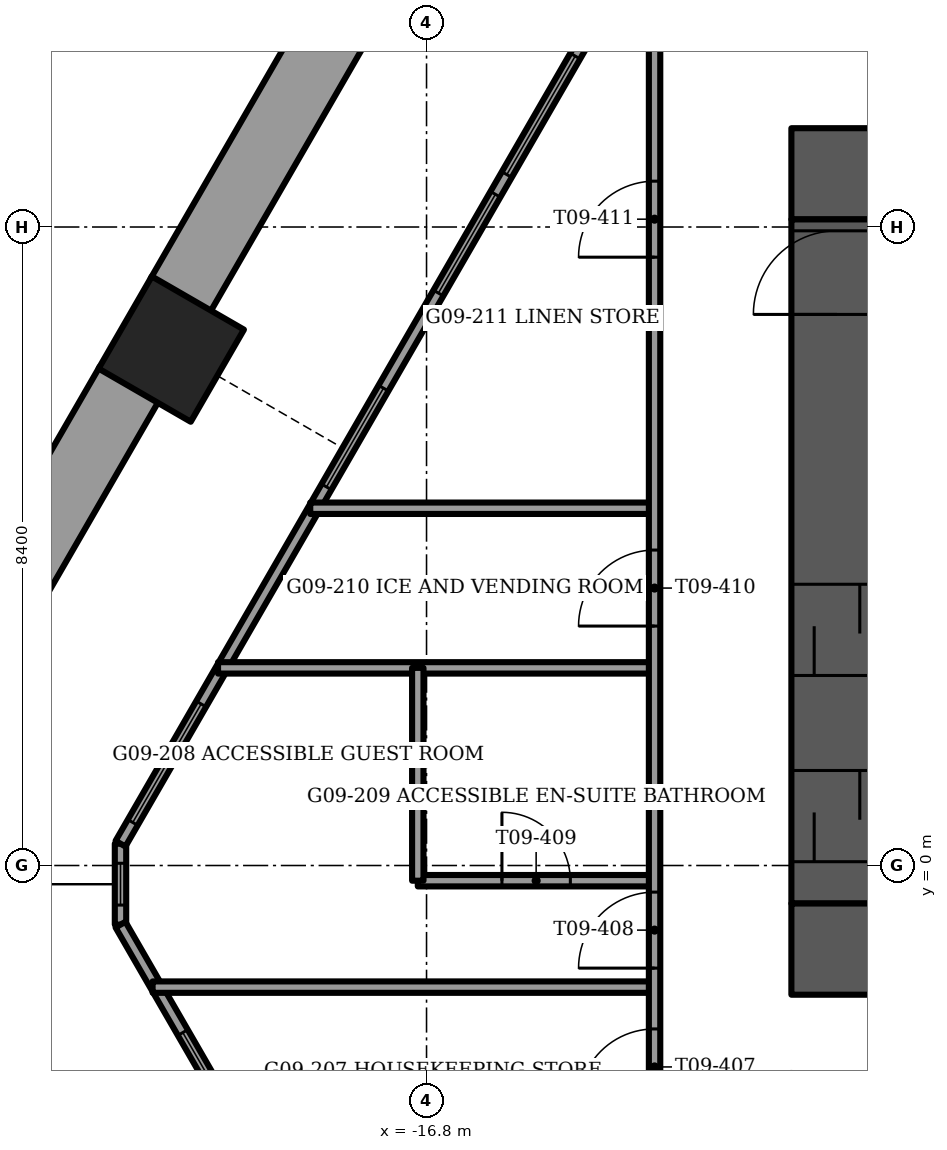
"""IFC4 building model, lengths in metres.
Left out: names, types, materials, properties, quantities, classifications, styles, units other than length and angle.
Written with IfcOpenShell. Run it as: python <this file> out.ifc"""

import sys

from ifc_helpers import new_model, si_unit, direction, frame, frame_2d, origin, origin_2d, place, context, subcontext, project, spatial, rectangle, extrude, element, fill, save


model = new_model("IFC4")
c1 = context("Model", 3, precision=1e-05, world=origin(), true_north=direction((0.0, 1.0)))
c2 = subcontext(c1, "Body", "Model", "MODEL_VIEW")
j1 = project(units=[si_unit("LENGTHUNIT", "METRE"), si_unit("PLANEANGLEUNIT", "RADIAN")], contexts=[c1])
p1 = place(None, origin())
s1 = spatial("IfcSite", under=j1, at=p1, CompositionType="ELEMENT")
p2 = place(p1, origin())
s2 = spatial("IfcBuilding", under=s1, at=p2, CompositionType="ELEMENT")
p3 = place(p2, frame((0.0, 0.0, 39.25)))
s3 = spatial("IfcBuildingStorey", under=s2, at=p3, CompositionType="ELEMENT", Elevation=39.25)
p4 = place(p3, frame((-20.158, 6.794, -1.2), z_axis=(0.0, 0.0, 1.0), x_axis=(0.5, 0.866025403784, 0.0)))
e1 = element("IfcColumn", 1, at=p4, inside=s3, PredefinedType="COLUMN", context=c2, shape_type="SweptSolid", body=[
    extrude(rectangle(XDim=1.4, YDim=1.4, at=origin_2d()), origin(), (0.0, 0.0, 1.0), 3.75),
])
p5 = place(p3, frame((-12.0, -1.1, -0.3), z_axis=(0.0, 0.0, 1.0), x_axis=(1.0, 0.0, 0.0)))
e2 = element("IfcWall", 2, at=p5, inside=s3, PredefinedType="SHEAR", context=c2, shape_type="SweptSolid", body=[
    extrude(rectangle(XDim=24.0, YDim=1.2, at=frame_2d((12.0, 0.0))), origin(), (0.0, 0.0, 1.0), 3.75),
])
p6 = place(p5, frame((11.2, 0.0, 0.0)))
e3 = element("IfcOpeningElement", 3, at=p6, cuts=e2, PredefinedType="OPENING", context=c2, shape_type="SweptSolid", body=[
    extrude(rectangle(XDim=1.6, YDim=2.1, at=frame_2d((0.8, 1.05))), frame((0.0, 0.6, 0.0), z_axis=(0.0, -1.0, 0.0), x_axis=(1.0, 0.0, 0.0)), (0.0, 0.0, 1.0), 1.2),
])
p7 = place(p3, frame((-12.0, 9.1, -0.3), z_axis=(0.0, 0.0, 1.0), x_axis=(1.0, 0.0, 0.0)))
e4 = element("IfcWall", 4, at=p7, inside=s3, PredefinedType="SHEAR", context=c2, shape_type="SweptSolid", body=[
    extrude(rectangle(XDim=24.0, YDim=1.2, at=frame_2d((12.0, 0.0))), origin(), (0.0, 0.0, 1.0), 3.75),
])
p8 = place(p7, frame((11.2, 0.0, 0.0)))
e5 = element("IfcOpeningElement", 5, at=p8, cuts=e4, PredefinedType="OPENING", context=c2, shape_type="SweptSolid", body=[
    extrude(rectangle(XDim=1.6, YDim=2.1, at=frame_2d((0.8, 1.05))), frame((0.0, 0.6, 0.0), z_axis=(0.0, -1.0, 0.0), x_axis=(1.0, 0.0, 0.0)), (0.0, 0.0, 1.0), 1.2),
])
p9 = place(p7, frame((5.25, 0.0, 0.0)))
e6 = element("IfcOpeningElement", 6, at=p9, cuts=e4, PredefinedType="OPENING", context=c2, shape_type="SweptSolid", body=[
    extrude(rectangle(XDim=1.1, YDim=2.1, at=frame_2d((0.55, 1.05))), frame((0.0, 0.6, 0.0), z_axis=(0.0, -1.0, 0.0), x_axis=(1.0, 0.0, 0.0)), (0.0, 0.0, 1.0), 1.2),
])
p10 = place(p7, frame((17.65, 0.0, 0.0)))
e7 = element("IfcOpeningElement", 7, at=p10, cuts=e4, PredefinedType="OPENING", context=c2, shape_type="SweptSolid", body=[
    extrude(rectangle(XDim=1.1, YDim=2.1, at=frame_2d((0.55, 1.05))), frame((0.0, 0.6, 0.0), z_axis=(0.0, -1.0, 0.0), x_axis=(1.0, 0.0, 0.0)), (0.0, 0.0, 1.0), 1.2),
])
p11 = place(p3, frame((-11.4, -0.5, -0.3), z_axis=(0.0, 0.0, 1.0), x_axis=(0.0, 1.0, 0.0)))
e8 = element("IfcWall", 8, at=p11, inside=s3, PredefinedType="SHEAR", context=c2, shape_type="SweptSolid", body=[
    extrude(rectangle(XDim=9.0, YDim=1.2, at=frame_2d((4.5, 0.0))), origin(), (0.0, 0.0, 1.0), 3.75),
])
p12 = place(p11, frame((7.75, 0.0, 0.0)))
e9 = element("IfcOpeningElement", 9, at=p12, cuts=e8, PredefinedType="OPENING", context=c2, shape_type="SweptSolid", body=[
    extrude(rectangle(XDim=1.1, YDim=2.1, at=frame_2d((0.55, 1.05))), frame((0.0, 0.6, 0.0), z_axis=(0.0, -1.0, 0.0), x_axis=(1.0, 0.0, 0.0)), (0.0, 0.0, 1.0), 1.2),
])
p13 = place(p11, frame((0.55, 0.0, 0.0)))
e10 = element("IfcOpeningElement", 10, at=p13, cuts=e8, PredefinedType="OPENING", context=c2, shape_type="SweptSolid", body=[
    extrude(rectangle(XDim=1.2, YDim=2.1, at=frame_2d((0.6, 1.05))), frame((0.0, 0.6, 0.0), z_axis=(0.0, -1.0, 0.0), x_axis=(1.0, 0.0, 0.0)), (0.0, 0.0, 1.0), 1.2),
])
p14 = place(p11, frame((3.0, 0.0, 0.0)))
e11 = element("IfcOpeningElement", 11, at=p14, cuts=e8, PredefinedType="OPENING", context=c2, shape_type="SweptSolid", body=[
    extrude(rectangle(XDim=1.2, YDim=2.1, at=frame_2d((0.6, 1.05))), frame((0.0, 0.6, 0.0), z_axis=(0.0, -1.0, 0.0), x_axis=(1.0, 0.0, 0.0)), (0.0, 0.0, 1.0), 1.2),
])
p15 = place(p3, frame((-16.514, 13.605, 0.0), z_axis=(0.0, 0.0, 1.0), x_axis=(-0.499997206141, -0.866027016814, 0.0)))
e12 = element("IfcWall", 12, at=p15, inside=s3, PredefinedType="PARAPET", context=c2, shape_type="SweptSolid", body=[
    extrude(rectangle(XDim=7.051, YDim=0.9, at=frame_2d((3.525, 0.0))), origin(), (0.0, 0.0, 1.0), 1.1),
])
p16 = place(p3, frame((-20.71, 6.339, 0.0), z_axis=(0.0, 0.0, 1.0), x_axis=(-0.499994135611, -0.866028789565, 0.0)))
e13 = element("IfcWall", 13, at=p16, inside=s3, PredefinedType="PARAPET", context=c2, shape_type="SweptSolid", body=[
    extrude(rectangle(XDim=6.845, YDim=0.9, at=frame_2d((3.423, 0.0))), origin(), (0.0, 0.0, 1.0), 1.1),
])
p17 = place(p3, frame((-24.132, -0.901, 0.0), z_axis=(0.0, 0.0, 1.0), x_axis=(0.499983599745, -0.866034872269, 0.0)))
e14 = element("IfcWall", 14, at=p17, inside=s3, PredefinedType="PARAPET", context=c2, shape_type="SweptSolid", body=[
    extrude(rectangle(XDim=6.42, YDim=0.9, at=frame_2d((3.21, 0.0))), origin(), (0.0, 0.0, 1.0), 1.1),
])
p18 = place(p3, frame((-9.276, 20.292, 0.0), z_axis=(0.0, 0.0, 1.0), x_axis=(-0.500006057782, -0.866021906294, 0.0)))
e15 = element("IfcWall", 15, at=p18, inside=s3, PredefinedType="SOLIDWALL", context=c2, shape_type="SweptSolid", body=[
    extrude(rectangle(XDim=23.1, YDim=0.15, at=frame_2d((11.55, 0.0))), origin(), (0.0, 0.0, 1.0), 3.45),
])
p19 = place(p18, frame((2.736, 0.0, 0.15)))
e16 = element("IfcOpeningElement", 16, at=p19, cuts=e15, PredefinedType="OPENING", context=c2, shape_type="SweptSolid", body=[
    extrude(rectangle(XDim=0.9, YDim=2.85, at=frame_2d((0.45, 1.425))), frame((0.0, 0.075, 0.0), z_axis=(0.0, -1.0, 0.0), x_axis=(1.0, 0.0, 0.0)), (0.0, 0.0, 1.0), 0.15),
])
p20 = place(p18, frame((3.825, 0.0, 0.15)))
e17 = element("IfcOpeningElement", 17, at=p20, cuts=e15, PredefinedType="OPENING", context=c2, shape_type="SweptSolid", body=[
    extrude(rectangle(XDim=1.5, YDim=2.85, at=frame_2d((0.75, 1.425))), frame((0.0, 0.075, 0.0), z_axis=(0.0, -1.0, 0.0), x_axis=(1.0, 0.0, 0.0)), (0.0, 0.0, 1.0), 0.15),
])
p21 = place(p18, frame((9.32, 0.0, 0.15)))
e18 = element("IfcOpeningElement", 18, at=p21, cuts=e15, PredefinedType="OPENING", context=c2, shape_type="SweptSolid", body=[
    extrude(rectangle(XDim=0.9, YDim=2.85, at=frame_2d((0.45, 1.425))), frame((0.0, 0.075, 0.0), z_axis=(0.0, -1.0, 0.0), x_axis=(1.0, 0.0, 0.0)), (0.0, 0.0, 1.0), 0.15),
])
p22 = place(p18, frame((7.12, 0.0, 0.15)))
e19 = element("IfcOpeningElement", 19, at=p22, cuts=e15, PredefinedType="OPENING", context=c2, shape_type="SweptSolid", body=[
    extrude(rectangle(XDim=1.5, YDim=2.85, at=frame_2d((0.75, 1.425))), frame((0.0, 0.075, 0.0), z_axis=(0.0, -1.0, 0.0), x_axis=(1.0, 0.0, 0.0)), (0.0, 0.0, 1.0), 0.15),
])
p23 = place(p18, frame((11.136, 0.0, 0.15)))
e20 = element("IfcOpeningElement", 20, at=p23, cuts=e15, PredefinedType="OPENING", context=c2, shape_type="SweptSolid", body=[
    extrude(rectangle(XDim=1.8, YDim=2.85, at=frame_2d((0.9, 1.425))), frame((0.0, 0.075, 0.0), z_axis=(0.0, -1.0, 0.0), x_axis=(1.0, 0.0, 0.0)), (0.0, 0.0, 1.0), 0.15),
])
p24 = place(p18, frame((13.236, 0.0, 0.15)))
e21 = element("IfcOpeningElement", 21, at=p24, cuts=e15, PredefinedType="OPENING", context=c2, shape_type="SweptSolid", body=[
    extrude(rectangle(XDim=1.5, YDim=2.85, at=frame_2d((0.75, 1.425))), frame((0.0, 0.075, 0.0), z_axis=(0.0, -1.0, 0.0), x_axis=(1.0, 0.0, 0.0)), (0.0, 0.0, 1.0), 0.15),
])
p25 = place(p18, frame((16.18, 0.0, 0.15)))
e22 = element("IfcOpeningElement", 22, at=p25, cuts=e15, PredefinedType="OPENING", context=c2, shape_type="SweptSolid", body=[
    extrude(rectangle(XDim=1.5, YDim=2.85, at=frame_2d((0.75, 1.425))), frame((0.0, 0.075, 0.0), z_axis=(0.0, -1.0, 0.0), x_axis=(1.0, 0.0, 0.0)), (0.0, 0.0, 1.0), 0.15),
])
p26 = place(p18, frame((0.44, 0.0, 0.15)))
e23 = element("IfcOpeningElement", 23, at=p26, cuts=e15, PredefinedType="OPENING", context=c2, shape_type="SweptSolid", body=[
    extrude(rectangle(XDim=0.9, YDim=2.73, at=frame_2d((0.45, 1.365))), frame((0.0, 0.075, 0.0), z_axis=(0.0, -1.0, 0.0), x_axis=(1.0, 0.0, 0.0)), (0.0, 0.0, 1.0), 0.15),
])
p27 = place(p18, frame((20.978, 0.0, 0.15)))
e24 = element("IfcOpeningElement", 24, at=p27, cuts=e15, PredefinedType="OPENING", context=c2, shape_type="SweptSolid", body=[
    extrude(rectangle(XDim=1.8, YDim=2.73, at=frame_2d((0.9, 1.365))), frame((0.0, 0.075, 0.0), z_axis=(0.0, -1.0, 0.0), x_axis=(1.0, 0.0, 0.0)), (0.0, 0.0, 1.0), 0.15),
])
p28 = place(p3, frame((-20.826, -0.778, 0.0), z_axis=(0.0, 0.0, 1.0), x_axis=(0.499999841607, -0.866025495233, 0.0)))
e25 = element("IfcWall", 25, at=p28, inside=s3, PredefinedType="SOLIDWALL", context=c2, shape_type="SweptSolid", body=[
    extrude(rectangle(XDim=19.479, YDim=0.15, at=frame_2d((9.739, 0.0))), origin(), (0.0, 0.0, 1.0), 3.45),
])
p29 = place(p28, frame((1.639, 0.0, 0.15)))
e26 = element("IfcOpeningElement", 26, at=p29, cuts=e25, PredefinedType="OPENING", context=c2, shape_type="SweptSolid", body=[
    extrude(rectangle(XDim=0.9, YDim=2.85, at=frame_2d((0.45, 1.425))), frame((0.0, 0.075, 0.0), z_axis=(0.0, -1.0, 0.0), x_axis=(1.0, 0.0, 0.0)), (0.0, 0.0, 1.0), 0.15),
])
p30 = place(p28, frame((5.839, 0.0, 0.15)))
e27 = element("IfcOpeningElement", 27, at=p30, cuts=e25, PredefinedType="OPENING", context=c2, shape_type="SweptSolid", body=[
    extrude(rectangle(XDim=1.8, YDim=2.85, at=frame_2d((0.9, 1.425))), frame((0.0, 0.075, 0.0), z_axis=(0.0, -1.0, 0.0), x_axis=(1.0, 0.0, 0.0)), (0.0, 0.0, 1.0), 0.15),
])
p31 = place(p28, frame((7.939, 0.0, 0.0)))
e28 = element("IfcOpeningElement", 28, at=p31, cuts=e25, PredefinedType="OPENING", context=c2, shape_type="SweptSolid", body=[
    extrude(rectangle(XDim=1.5, YDim=2.4, at=frame_2d((0.75, 1.2))), frame((0.0, 0.075, 0.0), z_axis=(0.0, -1.0, 0.0), x_axis=(1.0, 0.0, 0.0)), (0.0, 0.0, 1.0), 0.15),
])
p32 = place(p28, frame((10.039, 0.0, 0.15)))
e29 = element("IfcOpeningElement", 29, at=p32, cuts=e25, PredefinedType="OPENING", context=c2, shape_type="SweptSolid", body=[
    extrude(rectangle(XDim=1.8, YDim=2.85, at=frame_2d((0.9, 1.425))), frame((0.0, 0.075, 0.0), z_axis=(0.0, -1.0, 0.0), x_axis=(1.0, 0.0, 0.0)), (0.0, 0.0, 1.0), 0.15),
])
p33 = place(p28, frame((12.139, 0.0, 0.0)))
e30 = element("IfcOpeningElement", 30, at=p33, cuts=e25, PredefinedType="OPENING", context=c2, shape_type="SweptSolid", body=[
    extrude(rectangle(XDim=1.5, YDim=2.4, at=frame_2d((0.75, 1.2))), frame((0.0, 0.075, 0.0), z_axis=(0.0, -1.0, 0.0), x_axis=(1.0, 0.0, 0.0)), (0.0, 0.0, 1.0), 0.15),
])
p34 = place(p28, frame((14.239, 0.0, 0.15)))
e31 = element("IfcOpeningElement", 31, at=p34, cuts=e25, PredefinedType="OPENING", context=c2, shape_type="SweptSolid", body=[
    extrude(rectangle(XDim=1.8, YDim=2.85, at=frame_2d((0.9, 1.425))), frame((0.0, 0.075, 0.0), z_axis=(0.0, -1.0, 0.0), x_axis=(1.0, 0.0, 0.0)), (0.0, 0.0, 1.0), 0.15),
])
p35 = place(p28, frame((16.339, 0.0, 0.0)))
e32 = element("IfcOpeningElement", 32, at=p35, cuts=e25, PredefinedType="OPENING", context=c2, shape_type="SweptSolid", body=[
    extrude(rectangle(XDim=1.5, YDim=2.4, at=frame_2d((0.75, 1.2))), frame((0.0, 0.075, 0.0), z_axis=(0.0, -1.0, 0.0), x_axis=(1.0, 0.0, 0.0)), (0.0, 0.0, 1.0), 0.15),
])
p36 = place(p3, frame((-20.826, 0.287, 0.0), z_axis=(0.0, 0.0, 1.0), x_axis=(0.0, -1.0, 0.0)))
e33 = element("IfcWall", 33, at=p36, inside=s3, PredefinedType="SOLIDWALL", context=c2, shape_type="SweptSolid", body=[
    extrude(rectangle(XDim=1.065, YDim=0.15, at=frame_2d((0.533, 0.0))), origin(), (0.0, 0.0, 1.0), 3.45),
])
p37 = place(p36, frame((0.258, 0.0, 0.15)))
e34 = element("IfcOpeningElement", 34, at=p37, cuts=e33, PredefinedType="OPENING", context=c2, shape_type="SweptSolid", body=[
    extrude(rectangle(XDim=0.55, YDim=2.85, at=frame_2d((0.275, 1.425))), frame((0.0, 0.075, 0.0), z_axis=(0.0, -1.0, 0.0), x_axis=(1.0, 0.0, 0.0)), (0.0, 0.0, 1.0), 0.15),
])
p38 = place(p3, frame((-20.404, -1.6, 0.0), z_axis=(0.0, 0.0, 1.0), x_axis=(1.0, 0.0, 0.0)))
e35 = element("IfcWall", 35, at=p38, inside=s3, PredefinedType="PARTITIONING", context=c2, shape_type="SweptSolid", body=[
    extrude(rectangle(XDim=6.604, YDim=0.15, at=frame_2d((3.302, 0.0))), origin(), (0.0, 0.0, 1.0), 3.45),
])
p39 = place(p3, frame((-16.915, -0.2, 0.0), z_axis=(0.0, 0.0, 1.0), x_axis=(1.0, 0.0, 0.0)))
e36 = element("IfcWall", 36, at=p39, inside=s3, PredefinedType="PARTITIONING", context=c2, shape_type="SweptSolid", body=[
    extrude(rectangle(XDim=3.115, YDim=0.15, at=frame_2d((1.558, 0.0))), origin(), (0.0, 0.0, 1.0), 3.45),
])
p40 = place(p39, frame((1.107, 0.0, 0.0)))
e37 = element("IfcOpeningElement", 37, at=p40, cuts=e36, PredefinedType="OPENING", context=c2, shape_type="SweptSolid", body=[
    extrude(rectangle(XDim=0.9, YDim=2.1, at=frame_2d((0.45, 1.05))), frame((0.0, 0.075, 0.0), z_axis=(0.0, -1.0, 0.0), x_axis=(1.0, 0.0, 0.0)), (0.0, 0.0, 1.0), 0.15),
])
p41 = place(p3, frame((-19.543, 2.6, 0.0), z_axis=(0.0, 0.0, 1.0), x_axis=(1.0, 0.0, 0.0)))
e38 = element("IfcWall", 38, at=p41, inside=s3, PredefinedType="PARTITIONING", context=c2, shape_type="SweptSolid", body=[
    extrude(rectangle(XDim=5.743, YDim=0.15, at=frame_2d((2.872, 0.0))), origin(), (0.0, 0.0, 1.0), 3.45),
])
p42 = place(p3, frame((-18.33, 4.7, 0.0), z_axis=(0.0, 0.0, 1.0), x_axis=(1.0, 0.0, 0.0)))
e39 = element("IfcWall", 39, at=p42, inside=s3, PredefinedType="PARTITIONING", context=c2, shape_type="SweptSolid", body=[
    extrude(rectangle(XDim=4.53, YDim=0.15, at=frame_2d((2.265, 0.0))), origin(), (0.0, 0.0, 1.0), 3.45),
])
p43 = place(p3, frame((-13.8, -3.7, 0.0), z_axis=(0.0, 0.0, 1.0), x_axis=(0.0, 1.0, 0.0)))
e40 = element("IfcWall", 40, at=p43, inside=s3, PredefinedType="PARTITIONING", context=c2, shape_type="SweptSolid", body=[
    extrude(rectangle(XDim=16.247, YDim=0.15, at=frame_2d((8.124, 0.0))), origin(), (0.0, 0.0, 1.0), 3.45),
])
p44 = place(p43, frame((0.55, 0.0, 0.0)))
e41 = element("IfcOpeningElement", 41, at=p44, cuts=e40, PredefinedType="OPENING", context=c2, shape_type="SweptSolid", body=[
    extrude(rectangle(XDim=1.0, YDim=2.1, at=frame_2d((0.5, 1.05))), frame((0.0, 0.075, 0.0), z_axis=(0.0, -1.0, 0.0), x_axis=(1.0, 0.0, 0.0)), (0.0, 0.0, 1.0), 0.15),
])
p45 = place(p43, frame((2.35, 0.0, 0.0)))
e42 = element("IfcOpeningElement", 42, at=p45, cuts=e40, PredefinedType="OPENING", context=c2, shape_type="SweptSolid", body=[
    extrude(rectangle(XDim=1.0, YDim=2.1, at=frame_2d((0.5, 1.05))), frame((0.0, 0.075, 0.0), z_axis=(0.0, -1.0, 0.0), x_axis=(1.0, 0.0, 0.0)), (0.0, 0.0, 1.0), 0.15),
])
p46 = place(p43, frame((6.85, 0.0, 0.0)))
e43 = element("IfcOpeningElement", 43, at=p46, cuts=e40, PredefinedType="OPENING", context=c2, shape_type="SweptSolid", body=[
    extrude(rectangle(XDim=1.0, YDim=2.1, at=frame_2d((0.5, 1.05))), frame((0.0, 0.075, 0.0), z_axis=(0.0, -1.0, 0.0), x_axis=(1.0, 0.0, 0.0)), (0.0, 0.0, 1.0), 0.15),
])
p47 = place(p43, frame((11.703, 0.0, 0.0)))
e44 = element("IfcOpeningElement", 44, at=p47, cuts=e40, PredefinedType="OPENING", context=c2, shape_type="SweptSolid", body=[
    extrude(rectangle(XDim=1.0, YDim=2.1, at=frame_2d((0.5, 1.05))), frame((0.0, 0.075, 0.0), z_axis=(0.0, -1.0, 0.0), x_axis=(1.0, 0.0, 0.0)), (0.0, 0.0, 1.0), 0.15),
])
p48 = place(p3, frame((-16.915, -0.2, 0.0), z_axis=(0.0, 0.0, 1.0), x_axis=(0.0, 1.0, 0.0)))
e45 = element("IfcWall", 45, at=p48, inside=s3, PredefinedType="PARTITIONING", context=c2, shape_type="SweptSolid", body=[
    extrude(rectangle(XDim=2.8, YDim=0.15, at=frame_2d((1.4, 0.0))), origin(), (0.0, 0.0, 1.0), 3.45),
])
p49 = place(p23, origin())
e46 = element("IfcWindow", 46, at=p49, inside=s3, PartitioningType="SINGLE_PANEL", PredefinedType="WINDOW", context=c2, shape_type="SweptSolid", body=[
    extrude(rectangle(XDim=1.8, YDim=2.85, at=frame_2d((0.9, 1.425))), frame((0.0, 0.03, 0.0), z_axis=(0.0, -1.0, 0.0), x_axis=(1.0, 0.0, 0.0)), (0.0, 0.0, 1.0), 0.06),
])
fill(e20, e46)
p50 = place(p24, origin())
e47 = element("IfcWindow", 47, at=p50, inside=s3, PartitioningType="SINGLE_PANEL", PredefinedType="WINDOW", context=c2, shape_type="SweptSolid", body=[
    extrude(rectangle(XDim=1.5, YDim=2.85, at=frame_2d((0.75, 1.425))), frame((0.0, 0.03, 0.0), z_axis=(0.0, -1.0, 0.0), x_axis=(1.0, 0.0, 0.0)), (0.0, 0.0, 1.0), 0.06),
])
fill(e21, e47)
p51 = place(p25, origin())
e48 = element("IfcWindow", 48, at=p51, inside=s3, PartitioningType="SINGLE_PANEL", PredefinedType="WINDOW", context=c2, shape_type="SweptSolid", body=[
    extrude(rectangle(XDim=1.5, YDim=2.85, at=frame_2d((0.75, 1.425))), frame((0.0, 0.03, 0.0), z_axis=(0.0, -1.0, 0.0), x_axis=(1.0, 0.0, 0.0)), (0.0, 0.0, 1.0), 0.06),
])
fill(e22, e48)
p52 = place(p27, origin())
e49 = element("IfcWindow", 49, at=p52, inside=s3, PartitioningType="SINGLE_PANEL", PredefinedType="WINDOW", context=c2, shape_type="SweptSolid", body=[
    extrude(rectangle(XDim=1.8, YDim=2.73, at=frame_2d((0.9, 1.365))), frame((0.0, 0.03, 0.0), z_axis=(0.0, -1.0, 0.0), x_axis=(1.0, 0.0, 0.0)), (0.0, 0.0, 1.0), 0.06),
])
fill(e24, e49)
p53 = place(p29, origin())
e50 = element("IfcWindow", 50, at=p53, inside=s3, PartitioningType="SINGLE_PANEL", PredefinedType="WINDOW", context=c2, shape_type="SweptSolid", body=[
    extrude(rectangle(XDim=0.9, YDim=2.85, at=frame_2d((0.45, 1.425))), frame((0.0, 0.03, 0.0), z_axis=(0.0, -1.0, 0.0), x_axis=(1.0, 0.0, 0.0)), (0.0, 0.0, 1.0), 0.06),
])
fill(e26, e50)
p54 = place(p37, origin())
e51 = element("IfcWindow", 51, at=p54, inside=s3, PartitioningType="SINGLE_PANEL", PredefinedType="WINDOW", context=c2, shape_type="SweptSolid", body=[
    extrude(rectangle(XDim=0.55, YDim=2.85, at=frame_2d((0.275, 1.425))), frame((0.0, 0.03, 0.0), z_axis=(0.0, -1.0, 0.0), x_axis=(1.0, 0.0, 0.0)), (0.0, 0.0, 1.0), 0.06),
])
fill(e34, e51)
p55 = place(p12, origin())
e52 = element("IfcDoor", 52, at=p55, inside=s3, OperationType="SINGLE_SWING_LEFT", PredefinedType="DOOR", context=c2, shape_type="SweptSolid", body=[
    extrude(rectangle(XDim=1.1, YDim=2.1, at=frame_2d((0.55, 1.05))), frame((0.0, 0.025, 0.0), z_axis=(0.0, -1.0, 0.0), x_axis=(1.0, 0.0, 0.0)), (0.0, 0.0, 1.0), 0.05),
])
fill(e9, e52)
p56 = place(p13, origin())
e53 = element("IfcDoor", 53, at=p56, inside=s3, OperationType="SLIDING_TO_LEFT", PredefinedType="DOOR", context=c2, shape_type="SweptSolid", body=[
    extrude(rectangle(XDim=1.2, YDim=2.1, at=frame_2d((0.6, 1.05))), frame((0.0, 0.025, 0.0), z_axis=(0.0, -1.0, 0.0), x_axis=(1.0, 0.0, 0.0)), (0.0, 0.0, 1.0), 0.05),
])
fill(e10, e53)
p57 = place(p14, origin())
e54 = element("IfcDoor", 54, at=p57, inside=s3, OperationType="SLIDING_TO_LEFT", PredefinedType="DOOR", context=c2, shape_type="SweptSolid", body=[
    extrude(rectangle(XDim=1.2, YDim=2.1, at=frame_2d((0.6, 1.05))), frame((0.0, 0.025, 0.0), z_axis=(0.0, -1.0, 0.0), x_axis=(1.0, 0.0, 0.0)), (0.0, 0.0, 1.0), 0.05),
])
fill(e11, e54)
p58 = place(p44, origin())
e55 = element("IfcDoor", 55, at=p58, inside=s3, OperationType="SINGLE_SWING_LEFT", PredefinedType="DOOR", context=c2, shape_type="SweptSolid", body=[
    extrude(rectangle(XDim=1.0, YDim=2.1, at=frame_2d((0.5, 1.05))), frame((0.0, 0.025, 0.0), z_axis=(0.0, -1.0, 0.0), x_axis=(1.0, 0.0, 0.0)), (0.0, 0.0, 1.0), 0.05),
])
fill(e41, e55)
p59 = place(p45, origin())
e56 = element("IfcDoor", 56, at=p59, inside=s3, OperationType="SINGLE_SWING_LEFT", PredefinedType="DOOR", context=c2, shape_type="SweptSolid", body=[
    extrude(rectangle(XDim=1.0, YDim=2.1, at=frame_2d((0.5, 1.05))), frame((0.0, 0.025, 0.0), z_axis=(0.0, -1.0, 0.0), x_axis=(1.0, 0.0, 0.0)), (0.0, 0.0, 1.0), 0.05),
])
fill(e42, e56)
p60 = place(p40, origin())
e57 = element("IfcDoor", 57, at=p60, inside=s3, OperationType="SINGLE_SWING_RIGHT", PredefinedType="DOOR", context=c2, shape_type="SweptSolid", body=[
    extrude(rectangle(XDim=0.9, YDim=2.1, at=frame_2d((0.45, 1.05))), frame((0.0, 0.025, 0.0), z_axis=(0.0, -1.0, 0.0), x_axis=(1.0, 0.0, 0.0)), (0.0, 0.0, 1.0), 0.05),
])
fill(e37, e57)
p61 = place(p46, origin())
e58 = element("IfcDoor", 58, at=p61, inside=s3, OperationType="SINGLE_SWING_LEFT", PredefinedType="DOOR", context=c2, shape_type="SweptSolid", body=[
    extrude(rectangle(XDim=1.0, YDim=2.1, at=frame_2d((0.5, 1.05))), frame((0.0, 0.025, 0.0), z_axis=(0.0, -1.0, 0.0), x_axis=(1.0, 0.0, 0.0)), (0.0, 0.0, 1.0), 0.05),
])
fill(e43, e58)
p62 = place(p47, origin())
e59 = element("IfcDoor", 59, at=p62, inside=s3, OperationType="SINGLE_SWING_LEFT", PredefinedType="DOOR", context=c2, shape_type="SweptSolid", body=[
    extrude(rectangle(XDim=1.0, YDim=2.1, at=frame_2d((0.5, 1.05))), frame((0.0, 0.025, 0.0), z_axis=(0.0, -1.0, 0.0), x_axis=(1.0, 0.0, 0.0)), (0.0, 0.0, 1.0), 0.05),
])
fill(e44, e59)
save(model, sys.argv[1])
